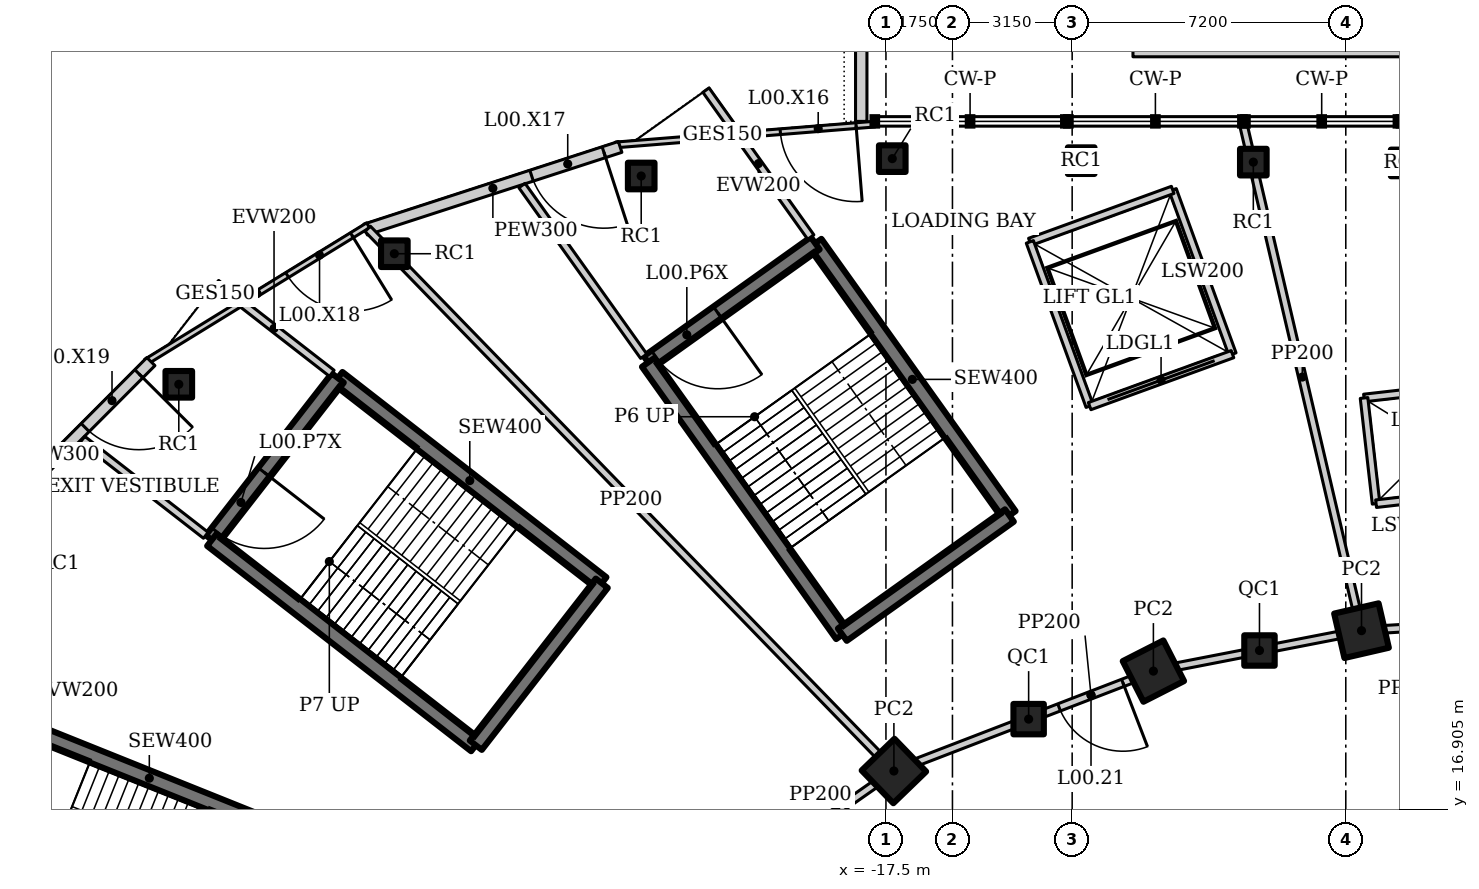
"""IFC4 building model, lengths in metres.
Left out: names, types, materials, properties, quantities, classifications, styles, units other than length and angle.
Written with IfcOpenShell. Run it as: python <this file> out.ifc"""

import sys

from ifc_helpers import new_model, si_unit, direction, frame, frame_2d, origin, origin_2d, place, context, subcontext, project, spatial, rectangle, hollow_rectangle, extrude, element, fill, save


model = new_model("IFC4")
c1 = context("Model", 3, precision=1e-05, world=origin(), true_north=direction((0.0, 1.0)))
c2 = subcontext(c1, "Body", "Model", "MODEL_VIEW")
j1 = project(units=[si_unit("LENGTHUNIT", "METRE"), si_unit("PLANEANGLEUNIT", "RADIAN")], contexts=[c1])
p1 = place(None, origin())
s1 = spatial("IfcSite", under=j1, at=p1, CompositionType="ELEMENT")
p2 = place(p1, origin())
s2 = spatial("IfcBuilding", under=s1, at=p2, CompositionType="ELEMENT")
p3 = place(p2, origin())
s3 = spatial("IfcBuildingStorey", under=s2, at=p3, CompositionType="ELEMENT", Elevation=0.0)
for number, where, z_axis, x_axis in (
    (1, (-4.986, 21.598, 0.0), (0.0, 0.0, 1.0), (0.974, 0.225, 0.0)),
    (2, (-10.463, 20.534, 0.0), (0.0, 0.0, 1.0), (0.891, 0.454, 0.0)),
    (3, (-17.291, 17.905, 0.0), (0.0, 0.0, 1.0), (0.719, 0.695, 0.0)),
):
    element("IfcColumn", number, at=place(p3, frame(where, z_axis=z_axis, x_axis=x_axis)), inside=s3, PredefinedType="COLUMN", context=c2, shape_type="SweptSolid", body=[
        extrude(hollow_rectangle(XDim=1.2, YDim=1.2, WallThickness=0.1, at=origin_2d()), origin(), (0.0, 0.0, 1.0), 6.5),
    ])
for number, where, z_axis, x_axis in (
    (4, (-7.671, 21.076, 0.0), (0.0, 0.0, 1.0), (1.0, 0.0, 0.0)),
    (5, (-13.745, 19.27, 0.0), (0.0, 0.0, 1.0), (1.0, 0.0, 0.0)),
):
    element("IfcColumn", number, at=place(p3, frame(where, z_axis=z_axis, x_axis=x_axis)), inside=s3, PredefinedType="COLUMN", context=c2, shape_type="SweptSolid", body=[
        extrude(hollow_rectangle(XDim=0.8, YDim=0.8, WallThickness=0.05, at=origin_2d()), origin(), (0.0, 0.0, 1.0), 6.5),
    ])
for number, where, z_axis, x_axis in (
    (6, (-3.863, 33.907, 0.0), (0.0, 0.0, 1.0), (1.0, 0.0, 0.0)),
    (7, (-12.363, 33.966, 0.0), (0.0, 0.0, 1.0), (1.0, 0.0, 0.0)),
    (8, (-23.94, 33.563, 0.0), (0.0, 0.0, 1.0), (1.0, 0.0, 0.0)),
    (9, (-36.108, 28.081, 0.0), (0.0, 0.0, 1.0), (1.0, 0.0, 0.0)),
    (10, (-7.833, 33.928, 0.0), (0.0, 0.0, 1.0), (1.0, 0.0, 0.0)),
    (11, (-17.334, 34.02, 0.0), (0.0, 0.0, 1.0), (1.0, 0.0, 0.0)),
    (12, (-30.436, 31.518, 0.0), (0.0, 0.0, 1.0), (1.0, 0.0, 0.0)),
):
    element("IfcColumn", number, at=place(p3, frame(where, z_axis=z_axis, x_axis=x_axis)), inside=s3, PredefinedType="COLUMN", context=c2, shape_type="SweptSolid", body=[
        extrude(hollow_rectangle(XDim=0.7, YDim=0.7, WallThickness=0.04, at=origin_2d()), origin(), (0.0, 0.0, 1.0), 6.5),
    ])
p4 = place(p3, frame((-17.788, 34.928, 0.0), z_axis=(0.0, 0.0, 1.0), x_axis=(-0.996791084449, -0.080047073422, 0.0)))
e13 = element("IfcWall", 13, at=p4, inside=s3, PredefinedType="ELEMENTEDWALL", context=c2, shape_type="SweptSolid", body=[
    extrude(rectangle(XDim=6.847, YDim=0.15, at=frame_2d((3.424, 0.0))), origin(), (0.0, 0.0, 1.0), 6.3),
])
p5 = place(p4, frame((0.5, 0.0, 0.0)))
e14 = element("IfcOpeningElement", 14, at=p5, cuts=e13, PredefinedType="OPENING", context=c2, shape_type="SweptSolid", body=[
    extrude(rectangle(XDim=2.0, YDim=2.4, at=frame_2d((1.0, 1.2))), frame((0.0, 0.085, 0.0), z_axis=(0.0, -1.0, 0.0), x_axis=(1.0, 0.0, 0.0)), (0.0, 0.0, 1.0), 0.17),
])
p6 = place(p3, frame((-24.495, 34.328, 0.0), z_axis=(0.0, 0.0, 1.0), x_axis=(-0.951140010357, -0.308759907853, 0.0)))
e15 = element("IfcWall", 15, at=p6, inside=s3, PredefinedType="SOLIDWALL", context=c2, shape_type="SweptSolid", body=[
    extrude(rectangle(XDim=7.041, YDim=0.3, at=frame_2d((3.521, 0.0))), origin(), (0.0, 0.0, 1.0), 6.3),
])
p7 = place(p6, frame((0.45, 0.0, 0.0)))
e16 = element("IfcOpeningElement", 16, at=p7, cuts=e15, PredefinedType="OPENING", context=c2, shape_type="SweptSolid", body=[
    extrude(rectangle(XDim=2.0, YDim=2.1, at=frame_2d((1.0, 1.05))), frame((0.0, 0.16, 0.0), z_axis=(0.0, -1.0, 0.0), x_axis=(1.0, 0.0, 0.0)), (0.0, 0.0, 1.0), 0.32),
])
p8 = place(p3, frame((-31.127, 32.266, 0.0), z_axis=(0.0, 0.0, 1.0), x_axis=(-0.851792686124, -0.523879012621, 0.0)))
e17 = element("IfcWall", 17, at=p8, inside=s3, PredefinedType="ELEMENTEDWALL", context=c2, shape_type="SweptSolid", body=[
    extrude(rectangle(XDim=6.861, YDim=0.15, at=frame_2d((3.43, 0.0))), origin(), (0.0, 0.0, 1.0), 6.3),
])
p9 = place(p8, frame((0.5, 0.0, 0.0)))
e18 = element("IfcOpeningElement", 18, at=p9, cuts=e17, PredefinedType="OPENING", context=c2, shape_type="SweptSolid", body=[
    extrude(rectangle(XDim=2.0, YDim=2.4, at=frame_2d((1.0, 1.2))), frame((0.0, 0.085, 0.0), z_axis=(0.0, -1.0, 0.0), x_axis=(1.0, 0.0, 0.0)), (0.0, 0.0, 1.0), 0.17),
])
p10 = place(p3, frame((-36.842, 28.679, 0.0), z_axis=(0.0, 0.0, 1.0), x_axis=(-0.705874614645, -0.708336804352, 0.0)))
e19 = element("IfcWall", 19, at=p10, inside=s3, PredefinedType="SOLIDWALL", context=c2, shape_type="SweptSolid", body=[
    extrude(rectangle(XDim=6.941, YDim=0.3, at=frame_2d((3.47, 0.0))), origin(), (0.0, 0.0, 1.0), 6.3),
])
p11 = place(p10, frame((0.45, 0.0, 0.0)))
e20 = element("IfcOpeningElement", 20, at=p11, cuts=e19, PredefinedType="OPENING", context=c2, shape_type="SweptSolid", body=[
    extrude(rectangle(XDim=2.0, YDim=2.1, at=frame_2d((1.0, 1.05))), frame((0.0, 0.16, 0.0), z_axis=(0.0, -1.0, 0.0), x_axis=(1.0, 0.0, 0.0)), (0.0, 0.0, 1.0), 0.32),
])
p12 = place(p3, frame((-11.0, 36.85, 0.0), z_axis=(0.0, 0.0, 1.0), x_axis=(1.0, 0.0, 0.0)))
e21 = element("IfcWall", 21, at=p12, inside=s3, PredefinedType="SOLIDWALL", context=c2, shape_type="SweptSolid", body=[
    extrude(rectangle(XDim=37.0, YDim=0.3, at=frame_2d((18.5, 0.0))), origin(), (0.0, 0.0, 1.0), 1.1),
])
p13 = place(p3, frame((-18.15, 43.3, 0.0), z_axis=(0.0, 0.0, 1.0), x_axis=(0.0, -1.0, 0.0)))
e22 = element("IfcWall", 22, at=p13, inside=s3, PredefinedType="SOLIDWALL", context=c2, shape_type="SweptSolid", body=[
    extrude(rectangle(XDim=8.3, YDim=0.3, at=frame_2d((4.15, 0.0))), origin(), (0.0, 0.0, 1.0), 1.1),
])
p14 = place(p3, frame((-19.477, 31.956, 0.0), z_axis=(0.0, 0.0, 1.0), x_axis=(-0.580683804281, 0.814129178599, 0.0)))
e23 = element("IfcWall", 23, at=p14, inside=s3, PredefinedType="SOLIDWALL", context=c2, shape_type="SweptSolid", body=[
    extrude(rectangle(XDim=4.75, YDim=0.2, at=frame_2d((2.375, 0.0))), origin(), (0.0, 0.0, 1.0), 6.3),
])
p15 = place(p3, frame((-23.874, 28.82, 0.0), z_axis=(0.0, 0.0, 1.0), x_axis=(-0.580677172045, 0.81413390905, 0.0)))
e24 = element("IfcWall", 24, at=p15, inside=s3, PredefinedType="SOLIDWALL", context=c2, shape_type="SweptSolid", body=[
    extrude(rectangle(XDim=5.517, YDim=0.2, at=frame_2d((2.759, 0.0))), origin(), (0.0, 0.0, 1.0), 6.3),
])
p16 = place(p3, frame((-32.082, 28.371, 0.0), z_axis=(0.0, 0.0, 1.0), x_axis=(-0.789376118937, 0.613909881702, 0.0)))
e25 = element("IfcWall", 25, at=p16, inside=s3, PredefinedType="SOLIDWALL", context=c2, shape_type="SweptSolid", body=[
    extrude(rectangle(XDim=3.85, YDim=0.2, at=frame_2d((1.925, 0.0))), origin(), (0.0, 0.0, 1.0), 6.3),
])
p17 = place(p3, frame((-35.397, 24.108, 0.0), z_axis=(0.0, 0.0, 1.0), x_axis=(-0.789342622909, 0.61395294906, 0.0)))
e26 = element("IfcWall", 26, at=p17, inside=s3, PredefinedType="SOLIDWALL", context=c2, shape_type="SweptSolid", body=[
    extrude(rectangle(XDim=4.111, YDim=0.2, at=frame_2d((2.055, 0.0))), origin(), (0.0, 0.0, 1.0), 6.3),
])
p18 = place(p3, frame((-2.478, 21.75, 0.0), z_axis=(0.0, 0.0, 1.0), x_axis=(-0.998172405641, -0.060430527186, 0.0)))
e27 = element("IfcWall", 27, at=p18, inside=s3, PredefinedType="SOLIDWALL", context=c2, shape_type="SweptSolid", body=[
    extrude(rectangle(XDim=2.513, YDim=0.2, at=frame_2d((1.256, 0.0))), origin(), (0.0, 0.0, 1.0), 5.896),
])
p19 = place(p3, frame((-4.986, 21.598, 0.0), z_axis=(0.0, 0.0, 1.0), x_axis=(-0.981637218105, -0.190757364289, 0.0)))
e28 = element("IfcWall", 28, at=p19, inside=s3, PredefinedType="SOLIDWALL", context=c2, shape_type="SweptSolid", body=[
    extrude(rectangle(XDim=2.735, YDim=0.2, at=frame_2d((1.368, 0.0))), origin(), (0.0, 0.0, 1.0), 5.774),
])
p20 = place(p3, frame((-7.671, 21.076, 0.0), z_axis=(0.0, 0.0, 1.0), x_axis=(-0.98163593748, -0.190763954266, 0.0)))
e29 = element("IfcWall", 29, at=p20, inside=s3, PredefinedType="SOLIDWALL", context=c2, shape_type="SweptSolid", body=[
    extrude(rectangle(XDim=2.844, YDim=0.2, at=frame_2d((1.422, 0.0))), origin(), (0.0, 0.0, 1.0), 5.85),
])
p21 = place(p3, frame((-10.463, 20.534, 0.0), z_axis=(0.0, 0.0, 1.0), x_axis=(-0.933241815012, -0.359248820058, 0.0)))
e30 = element("IfcWall", 30, at=p21, inside=s3, PredefinedType="SOLIDWALL", context=c2, shape_type="SweptSolid", body=[
    extrude(rectangle(XDim=3.518, YDim=0.2, at=frame_2d((1.759, 0.0))), origin(), (0.0, 0.0, 1.0), 5.896),
])
p22 = place(p21, frame((0.859, 0.0, 0.0)))
e31 = element("IfcOpeningElement", 31, at=p22, cuts=e30, PredefinedType="OPENING", context=c2, shape_type="SweptSolid", body=[
    extrude(rectangle(XDim=1.8, YDim=2.4, at=frame_2d((0.9, 1.2))), frame((0.0, 0.11, 0.0), z_axis=(0.0, -1.0, 0.0), x_axis=(1.0, 0.0, 0.0)), (0.0, 0.0, 1.0), 0.22),
])
p23 = place(p3, frame((-13.745, 19.27, 0.0), z_axis=(0.0, 0.0, 1.0), x_axis=(-0.933224646415, -0.359293416754, 0.0)))
e32 = element("IfcWall", 32, at=p23, inside=s3, PredefinedType="SOLIDWALL", context=c2, shape_type="SweptSolid", body=[
    extrude(rectangle(XDim=3.799, YDim=0.2, at=frame_2d((1.899, 0.0))), origin(), (0.0, 0.0, 1.0), 5.7),
])
p24 = place(p3, frame((-17.291, 17.905, 0.0), z_axis=(0.0, 0.0, 1.0), x_axis=(-0.819409395821, -0.573208724672, 0.0)))
e33 = element("IfcWall", 33, at=p24, inside=s3, PredefinedType="SOLIDWALL", context=c2, shape_type="SweptSolid", body=[
    extrude(rectangle(XDim=3.683, YDim=0.2, at=frame_2d((1.841, 0.0))), origin(), (0.0, 0.0, 1.0), 5.896),
])
p25 = place(p3, frame((-4.986, 21.598, 0.0), z_axis=(0.0, 0.0, 1.0), x_axis=(-0.227372072823, 0.973807958737, 0.0)))
e34 = element("IfcWall", 34, at=p25, inside=s3, PredefinedType="SOLIDWALL", context=c2, shape_type="SweptSolid", body=[
    extrude(rectangle(XDim=13.706, YDim=0.2, at=frame_2d((6.853, 0.0))), origin(), (0.0, 0.0, 1.0), 5.358),
])
p26 = place(p3, frame((-17.291, 17.905, 0.0), z_axis=(0.0, 0.0, 1.0), x_axis=(-0.696460684513, 0.717594951855, 0.0)))
e35 = element("IfcWall", 35, at=p26, inside=s3, PredefinedType="SOLIDWALL", context=c2, shape_type="SweptSolid", body=[
    extrude(rectangle(XDim=19.881, YDim=0.2, at=frame_2d((9.94, 0.0))), origin(), (0.0, 0.0, 1.0), 4.8),
])
p27 = place(p3, frame((-14.251, 24.629, 0.0), z_axis=(0.0, 0.0, 1.0), x_axis=(-0.580705313356, 0.814113836659, 0.0)))
e36 = element("IfcWall", 36, at=p27, inside=s3, PredefinedType="SHEAR", context=c2, shape_type="SweptSolid", body=[
    extrude(rectangle(XDim=8.8, YDim=0.4, at=frame_2d((4.4, 0.0))), origin(), (0.0, 0.0, 1.0), 6.5),
])
p28 = place(p3, frame((-19.361, 31.793, 0.0), z_axis=(0.0, 0.0, 1.0), x_axis=(-0.814121252423, -0.580694916762, 0.0)))
e37 = element("IfcWall", 37, at=p28, inside=s3, PredefinedType="SHEAR", context=c2, shape_type="SweptSolid", body=[
    extrude(rectangle(XDim=5.4, YDim=0.4, at=frame_2d((2.7, 0.0))), origin(), (0.0, 0.0, 1.0), 6.5),
])
p29 = place(p28, frame((3.15, 0.0, 0.0)))
e38 = element("IfcOpeningElement", 38, at=p29, cuts=e37, PredefinedType="OPENING", context=c2, shape_type="SweptSolid", body=[
    extrude(rectangle(XDim=2.0, YDim=2.1, at=frame_2d((1.0, 1.05))), frame((0.0, 0.21, 0.0), z_axis=(0.0, -1.0, 0.0), x_axis=(1.0, 0.0, 0.0)), (0.0, 0.0, 1.0), 0.42),
])
p30 = place(p3, frame((-23.757, 28.657, 0.0), z_axis=(0.0, 0.0, 1.0), x_axis=(0.580705313356, -0.814113836659, 0.0)))
e39 = element("IfcWall", 39, at=p30, inside=s3, PredefinedType="SHEAR", context=c2, shape_type="SweptSolid", body=[
    extrude(rectangle(XDim=8.8, YDim=0.4, at=frame_2d((4.4, 0.0))), origin(), (0.0, 0.0, 1.0), 6.5),
])
p31 = place(p3, frame((-18.647, 21.493, 0.0), z_axis=(0.0, 0.0, 1.0), x_axis=(0.814121252423, 0.580694916762, 0.0)))
e40 = element("IfcWall", 40, at=p31, inside=s3, PredefinedType="SHEAR", context=c2, shape_type="SweptSolid", body=[
    extrude(rectangle(XDim=5.4, YDim=0.4, at=frame_2d((2.7, 0.0))), origin(), (0.0, 0.0, 1.0), 6.5),
])
p32 = place(p3, frame((-24.978, 22.846, 0.0), z_axis=(0.0, 0.0, 1.0), x_axis=(-0.78938060008, 0.613904119726, 0.0)))
e41 = element("IfcWall", 41, at=p32, inside=s3, PredefinedType="SHEAR", context=c2, shape_type="SweptSolid", body=[
    extrude(rectangle(XDim=8.8, YDim=0.4, at=frame_2d((4.4, 0.0))), origin(), (0.0, 0.0, 1.0), 6.5),
])
p33 = place(p3, frame((-31.924, 28.248, 0.0), z_axis=(0.0, 0.0, 1.0), x_axis=(-0.613912443548, -0.789374126544, 0.0)))
e42 = element("IfcWall", 42, at=p33, inside=s3, PredefinedType="SHEAR", context=c2, shape_type="SweptSolid", body=[
    extrude(rectangle(XDim=5.4, YDim=0.4, at=frame_2d((2.7, 0.0))), origin(), (0.0, 0.0, 1.0), 6.5),
])
p34 = place(p33, frame((3.15, 0.0, 0.0)))
e43 = element("IfcOpeningElement", 43, at=p34, cuts=e42, PredefinedType="OPENING", context=c2, shape_type="SweptSolid", body=[
    extrude(rectangle(XDim=2.0, YDim=2.1, at=frame_2d((1.0, 1.05))), frame((0.0, 0.21, 0.0), z_axis=(0.0, -1.0, 0.0), x_axis=(1.0, 0.0, 0.0)), (0.0, 0.0, 1.0), 0.42),
])
p35 = place(p3, frame((-35.239, 23.985, 0.0), z_axis=(0.0, 0.0, 1.0), x_axis=(0.78938060008, -0.613904119726, 0.0)))
e44 = element("IfcWall", 44, at=p35, inside=s3, PredefinedType="SHEAR", context=c2, shape_type="SweptSolid", body=[
    extrude(rectangle(XDim=8.8, YDim=0.4, at=frame_2d((4.4, 0.0))), origin(), (0.0, 0.0, 1.0), 6.5),
])
p36 = place(p3, frame((-28.293, 18.583, 0.0), z_axis=(0.0, 0.0, 1.0), x_axis=(0.613912443548, 0.789374126544, 0.0)))
e45 = element("IfcWall", 45, at=p36, inside=s3, PredefinedType="SHEAR", context=c2, shape_type="SweptSolid", body=[
    extrude(rectangle(XDim=5.4, YDim=0.4, at=frame_2d((2.7, 0.0))), origin(), (0.0, 0.0, 1.0), 6.5),
])
p37 = place(p3, frame((-32.8, 16.077, 0.0), z_axis=(0.0, 0.0, 1.0), x_axis=(-0.92801678004, 0.372538395288, 0.0)))
e46 = element("IfcWall", 46, at=p37, inside=s3, PredefinedType="SHEAR", context=c2, shape_type="SweptSolid", body=[
    extrude(rectangle(XDim=8.8, YDim=0.4, at=frame_2d((4.4, 0.0))), origin(), (0.0, 0.0, 1.0), 6.5),
])
p38 = place(p3, frame((-1.442, 28.117, 0.0), z_axis=(0.0, 0.0, 1.0), x_axis=(-0.993571061716, -0.113210182053, 0.0)))
e47 = element("IfcWall", 47, at=p38, inside=s3, PredefinedType="SOLIDWALL", context=c2, shape_type="SweptSolid", body=[
    extrude(rectangle(XDim=3.5, YDim=0.2, at=frame_2d((1.75, 0.0))), origin(), (0.0, 0.0, 1.0), 6.3),
])
p39 = place(p3, frame((-4.92, 27.721, 0.0), z_axis=(0.0, 0.0, 1.0), x_axis=(0.113177712989, -0.993574760792, 0.0)))
e48 = element("IfcWall", 48, at=p39, inside=s3, PredefinedType="SOLIDWALL", context=c2, shape_type="SweptSolid", body=[
    extrude(rectangle(XDim=2.8, YDim=0.2, at=frame_2d((1.4, 0.0))), origin(), (0.0, 0.0, 1.0), 6.3),
])
p40 = place(p3, frame((-4.603, 24.939, 0.0), z_axis=(0.0, 0.0, 1.0), x_axis=(0.993571061716, 0.113210182053, 0.0)))
e49 = element("IfcWall", 49, at=p40, inside=s3, PredefinedType="SOLIDWALL", context=c2, shape_type="SweptSolid", body=[
    extrude(rectangle(XDim=3.5, YDim=0.2, at=frame_2d((1.75, 0.0))), origin(), (0.0, 0.0, 1.0), 6.3),
])
p41 = place(p40, frame((1.2, 0.0, 0.0)))
e50 = element("IfcOpeningElement", 50, at=p41, cuts=e49, PredefinedType="OPENING", context=c2, shape_type="SweptSolid", body=[
    extrude(rectangle(XDim=1.1, YDim=2.2, at=frame_2d((0.55, 1.1))), frame((0.0, 0.11, 0.0), z_axis=(0.0, -1.0, 0.0), x_axis=(1.0, 0.0, 0.0)), (0.0, 0.0, 1.0), 0.22),
])
p42 = place(p3, frame((-8.381, 28.875, 0.0), z_axis=(0.0, 0.0, 1.0), x_axis=(-0.342045591466, 0.93968335803, 0.0)))
e51 = element("IfcWall", 51, at=p42, inside=s3, PredefinedType="SOLIDWALL", context=c2, shape_type="SweptSolid", body=[
    extrude(rectangle(XDim=4.6, YDim=0.2, at=frame_2d((2.3, 0.0))), origin(), (0.0, 0.0, 1.0), 6.3),
])
p43 = place(p3, frame((-9.955, 33.198, 0.0), z_axis=(0.0, 0.0, 1.0), x_axis=(-0.939686455819, -0.342037080957, 0.0)))
e52 = element("IfcWall", 52, at=p43, inside=s3, PredefinedType="SOLIDWALL", context=c2, shape_type="SweptSolid", body=[
    extrude(rectangle(XDim=4.0, YDim=0.2, at=frame_2d((2.0, 0.0))), origin(), (0.0, 0.0, 1.0), 6.3),
])
p44 = place(p3, frame((-13.713, 31.829, 0.0), z_axis=(0.0, 0.0, 1.0), x_axis=(0.342062650202, -0.939677148459, 0.0)))
e53 = element("IfcWall", 53, at=p44, inside=s3, PredefinedType="SOLIDWALL", context=c2, shape_type="SweptSolid", body=[
    extrude(rectangle(XDim=4.6, YDim=0.2, at=frame_2d((2.3, 0.0))), origin(), (0.0, 0.0, 1.0), 6.3),
])
p45 = place(p3, frame((-12.14, 27.507, 0.0), z_axis=(0.0, 0.0, 1.0), x_axis=(0.939706071622, 0.341983185197, 0.0)))
e54 = element("IfcWall", 54, at=p45, inside=s3, PredefinedType="SOLIDWALL", context=c2, shape_type="SweptSolid", body=[
    extrude(rectangle(XDim=4.0, YDim=0.2, at=frame_2d((2.0, 0.0))), origin(), (0.0, 0.0, 1.0), 6.3),
])
p46 = place(p45, frame((0.5, 0.0, 0.0)))
e55 = element("IfcOpeningElement", 55, at=p46, cuts=e54, PredefinedType="OPENING", context=c2, shape_type="SweptSolid", body=[
    extrude(rectangle(XDim=3.0, YDim=3.0, at=frame_2d((1.5, 1.5))), frame((0.0, 0.11, 0.0), z_axis=(0.0, -1.0, 0.0), x_axis=(1.0, 0.0, 0.0)), (0.0, 0.0, 1.0), 0.22),
])
p47 = place(p5, origin())
e56 = element("IfcDoor", 56, at=p47, inside=s3, OperationType="DOUBLE_DOOR_DOUBLE_SWING", PredefinedType="DOOR", context=c2, shape_type="SweptSolid", body=[
    extrude(rectangle(XDim=2.0, YDim=2.4, at=frame_2d((1.0, 1.2))), frame((0.0, 0.025, 0.0), z_axis=(0.0, -1.0, 0.0), x_axis=(1.0, 0.0, 0.0)), (0.0, 0.0, 1.0), 0.05),
])
fill(e14, e56)
p48 = place(p7, origin())
e57 = element("IfcDoor", 57, at=p48, inside=s3, OperationType="DOUBLE_DOOR_DOUBLE_SWING", PredefinedType="DOOR", context=c2, shape_type="SweptSolid", body=[
    extrude(rectangle(XDim=2.0, YDim=2.1, at=frame_2d((1.0, 1.05))), frame((0.0, 0.025, 0.0), z_axis=(0.0, -1.0, 0.0), x_axis=(1.0, 0.0, 0.0)), (0.0, 0.0, 1.0), 0.05),
])
fill(e16, e57)
p49 = place(p9, origin())
e58 = element("IfcDoor", 58, at=p49, inside=s3, OperationType="DOUBLE_DOOR_DOUBLE_SWING", PredefinedType="DOOR", context=c2, shape_type="SweptSolid", body=[
    extrude(rectangle(XDim=2.0, YDim=2.4, at=frame_2d((1.0, 1.2))), frame((0.0, 0.025, 0.0), z_axis=(0.0, -1.0, 0.0), x_axis=(1.0, 0.0, 0.0)), (0.0, 0.0, 1.0), 0.05),
])
fill(e18, e58)
p50 = place(p11, origin())
e59 = element("IfcDoor", 59, at=p50, inside=s3, OperationType="DOUBLE_DOOR_DOUBLE_SWING", PredefinedType="DOOR", context=c2, shape_type="SweptSolid", body=[
    extrude(rectangle(XDim=2.0, YDim=2.1, at=frame_2d((1.0, 1.05))), frame((0.0, 0.025, 0.0), z_axis=(0.0, -1.0, 0.0), x_axis=(1.0, 0.0, 0.0)), (0.0, 0.0, 1.0), 0.05),
])
fill(e20, e59)
p51 = place(p22, origin())
e60 = element("IfcDoor", 60, at=p51, inside=s3, OperationType="DOUBLE_DOOR_DOUBLE_SWING", PredefinedType="DOOR", context=c2, shape_type="SweptSolid", body=[
    extrude(rectangle(XDim=1.8, YDim=2.4, at=frame_2d((0.9, 1.2))), frame((0.0, 0.025, 0.0), z_axis=(0.0, -1.0, 0.0), x_axis=(1.0, 0.0, 0.0)), (0.0, 0.0, 1.0), 0.05),
])
fill(e31, e60)
p52 = place(p29, origin())
e61 = element("IfcDoor", 61, at=p52, inside=s3, OperationType="DOUBLE_DOOR_DOUBLE_SWING", PredefinedType="DOOR", context=c2, shape_type="SweptSolid", body=[
    extrude(rectangle(XDim=2.0, YDim=2.1, at=frame_2d((1.0, 1.05))), frame((0.0, 0.025, 0.0), z_axis=(0.0, -1.0, 0.0), x_axis=(1.0, 0.0, 0.0)), (0.0, 0.0, 1.0), 0.05),
])
fill(e38, e61)
p53 = place(p34, origin())
e62 = element("IfcDoor", 62, at=p53, inside=s3, OperationType="DOUBLE_DOOR_DOUBLE_SWING", PredefinedType="DOOR", context=c2, shape_type="SweptSolid", body=[
    extrude(rectangle(XDim=2.0, YDim=2.1, at=frame_2d((1.0, 1.05))), frame((0.0, 0.025, 0.0), z_axis=(0.0, -1.0, 0.0), x_axis=(1.0, 0.0, 0.0)), (0.0, 0.0, 1.0), 0.05),
])
fill(e43, e62)
p54 = place(p46, origin())
e63 = element("IfcDoor", 63, at=p54, inside=s3, OperationType="DOUBLE_DOOR_SLIDING", PredefinedType="DOOR", context=c2, shape_type="SweptSolid", body=[
    extrude(rectangle(XDim=3.0, YDim=3.0, at=frame_2d((1.5, 1.5))), frame((0.0, 0.025, 0.0), z_axis=(0.0, -1.0, 0.0), x_axis=(1.0, 0.0, 0.0)), (0.0, 0.0, 1.0), 0.05),
])
fill(e55, e63)
save(model, sys.argv[1])
